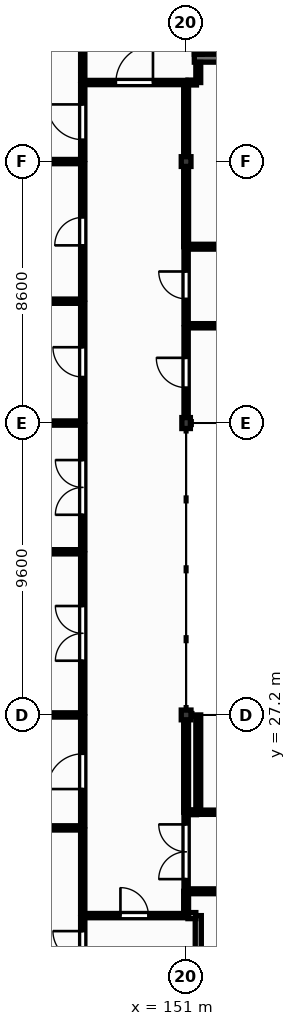
"""IFC4 building model, lengths in metres.
Left out: names, types, materials, properties, quantities, classifications, styles, units other than length and angle.
Written with IfcOpenShell. Run it as: python <this file> out.ifc"""

import sys

from ifc_helpers import new_model, si_unit, direction, frame, frame_2d, origin, origin_2d, place, context, subcontext, project, spatial, rectangle, extrude, element, fill, save


model = new_model("IFC4")
c1 = context("Model", 3, precision=1e-05, world=origin(), true_north=direction((0.0, 1.0)))
c2 = subcontext(c1, "Body", "Model", "MODEL_VIEW")
j1 = project(units=[si_unit("LENGTHUNIT", "METRE"), si_unit("PLANEANGLEUNIT", "RADIAN")], contexts=[c1])
p1 = place(None, origin())
s1 = spatial("IfcSite", under=j1, at=p1, CompositionType="ELEMENT")
p2 = place(p1, origin())
s2 = spatial("IfcBuilding", under=s1, at=p2, CompositionType="ELEMENT")
p3 = place(p2, frame((0.0, 0.0, 9.0)))
s3 = spatial("IfcBuildingStorey", under=s2, at=p3, CompositionType="ELEMENT", Elevation=9.0)
p4 = place(p3, frame((151.0, 27.2, 0.0), z_axis=(0.0, 0.0, 1.0), x_axis=(1.0, 0.0, 0.0)))
e1 = element("IfcColumn", 1, at=p4, inside=s3, PredefinedType="COLUMN", context=c2, shape_type="SweptSolid", body=[
    extrude(rectangle(XDim=0.32, YDim=0.32, at=origin_2d()), origin(), (0.0, 0.0, 1.0), 5.775),
])
p5 = place(p3, frame((151.0, 36.8, 0.0), z_axis=(0.0, 0.0, 1.0), x_axis=(1.0, 0.0, 0.0)))
e2 = element("IfcColumn", 2, at=p5, inside=s3, PredefinedType="COLUMN", context=c2, shape_type="SweptSolid", body=[
    extrude(rectangle(XDim=0.28, YDim=0.36, at=origin_2d()), origin(), (0.0, 0.0, 1.0), 5.775),
])
p6 = place(p3, frame((151.0, 45.4, 0.0), z_axis=(0.0, 0.0, 1.0), x_axis=(1.0, 0.0, 0.0)))
e3 = element("IfcColumn", 3, at=p6, inside=s3, PredefinedType="COLUMN", context=c2, shape_type="SweptSolid", body=[
    extrude(rectangle(XDim=0.32, YDim=0.32, at=origin_2d()), origin(), (0.0, 0.0, 1.0), 5.775),
])
p7 = place(p3, frame((151.27, 48.8, 0.0), z_axis=(0.0, 0.0, 1.0), x_axis=(1.0, 0.0, 0.0)))
e4 = element("IfcWall", 4, at=p7, inside=s3, PredefinedType="SHEAR", context=c2, shape_type="SweptSolid", body=[
    extrude(rectangle(XDim=6.66, YDim=0.26, at=frame_2d((3.33, 0.0))), origin(), (0.0, 0.0, 1.0), 3.95),
])
p8 = place(p3, frame((151.4, 48.93, 0.0), z_axis=(0.0, 0.0, 1.0), x_axis=(0.0, 1.0, 0.0)))
e5 = element("IfcWall", 5, at=p8, inside=s3, PredefinedType="SHEAR", context=c2, shape_type="SweptSolid", body=[
    extrude(rectangle(XDim=2.94, YDim=0.26, at=frame_2d((1.47, 0.0))), origin(), (0.0, 0.0, 1.0), 3.95),
])
p9 = place(p8, frame((0.91, 0.0, 0.0)))
e6 = element("IfcOpeningElement", 6, at=p9, cuts=e5, PredefinedType="OPENING", context=c2, shape_type="SweptSolid", body=[
    extrude(rectangle(XDim=1.12, YDim=2.1, at=frame_2d((0.56, 1.05))), frame((0.0, 0.14, 0.0), z_axis=(0.0, -1.0, 0.0), x_axis=(1.0, 0.0, 0.0)), (0.0, 0.0, 1.0), 0.28),
])
p10 = place(p3, frame((143.8, 23.485, 0.0), z_axis=(0.0, 0.0, 1.0), x_axis=(1.0, 0.0, 0.0)))
e7 = element("IfcWall", 7, at=p10, inside=s3, PredefinedType="PARTITIONING", context=c2, shape_type="SweptSolid", body=[
    extrude(rectangle(XDim=3.8, YDim=0.14, at=frame_2d((1.9, 0.0))), origin(), (0.0, 0.0, 1.0), 3.78),
])
p11 = place(p3, frame((143.94, 27.2, 0.0), z_axis=(0.0, 0.0, 1.0), x_axis=(1.0, 0.0, 0.0)))
e8 = element("IfcWall", 8, at=p11, inside=s3, PredefinedType="PARTITIONING", context=c2, shape_type="SweptSolid", body=[
    extrude(rectangle(XDim=3.66, YDim=0.14, at=frame_2d((1.83, 0.0))), origin(), (0.0, 0.0, 1.0), 3.78),
])
p12 = place(p3, frame((143.8, 32.566, 0.0), z_axis=(0.0, 0.0, 1.0), x_axis=(1.0, 0.0, 0.0)))
e9 = element("IfcWall", 9, at=p12, inside=s3, PredefinedType="PARTITIONING", context=c2, shape_type="SweptSolid", body=[
    extrude(rectangle(XDim=3.8, YDim=0.14, at=frame_2d((1.9, 0.0))), origin(), (0.0, 0.0, 1.0), 3.78),
])
p13 = place(p3, frame((143.96, 36.8, 0.0), z_axis=(0.0, 0.0, 1.0), x_axis=(1.0, 0.0, 0.0)))
e10 = element("IfcWall", 10, at=p13, inside=s3, PredefinedType="PARTITIONING", context=c2, shape_type="SweptSolid", body=[
    extrude(rectangle(XDim=3.64, YDim=0.14, at=frame_2d((1.82, 0.0))), origin(), (0.0, 0.0, 1.0), 3.78),
])
p14 = place(p3, frame((143.8, 40.808, 0.0), z_axis=(0.0, 0.0, 1.0), x_axis=(1.0, 0.0, 0.0)))
e11 = element("IfcWall", 11, at=p14, inside=s3, PredefinedType="PARTITIONING", context=c2, shape_type="SweptSolid", body=[
    extrude(rectangle(XDim=3.8, YDim=0.14, at=frame_2d((1.9, 0.0))), origin(), (0.0, 0.0, 1.0), 3.78),
])
p15 = place(p3, frame((143.94, 45.4, 0.0), z_axis=(0.0, 0.0, 1.0), x_axis=(1.0, 0.0, 0.0)))
e12 = element("IfcWall", 12, at=p15, inside=s3, PredefinedType="PARTITIONING", context=c2, shape_type="SweptSolid", body=[
    extrude(rectangle(XDim=3.66, YDim=0.14, at=frame_2d((1.83, 0.0))), origin(), (0.0, 0.0, 1.0), 3.78),
])
p16 = place(p3, frame((147.6, 18.67, 0.0), z_axis=(0.0, 0.0, 1.0), x_axis=(0.0, 1.0, 0.0)))
e13 = element("IfcWall", 13, at=p16, inside=s3, PredefinedType="PARTITIONING", context=c2, shape_type="SweptSolid", body=[
    extrude(rectangle(XDim=1.86, YDim=0.14, at=frame_2d((0.93, 0.0))), origin(), (0.0, 0.0, 1.0), 3.78),
])
p17 = place(p16, frame((0.44, 0.0, 0.0)))
e14 = element("IfcOpeningElement", 14, at=p17, cuts=e13, PredefinedType="OPENING", context=c2, shape_type="SweptSolid", body=[
    extrude(rectangle(XDim=0.98, YDim=2.15, at=frame_2d((0.49, 1.075))), frame((0.0, 0.08, 0.0), z_axis=(0.0, -1.0, 0.0), x_axis=(1.0, 0.0, 0.0)), (0.0, 0.0, 1.0), 0.16),
])
p18 = place(p3, frame((147.6, 20.67, 0.0), z_axis=(0.0, 0.0, 1.0), x_axis=(0.0, 1.0, 0.0)))
e15 = element("IfcWall", 15, at=p18, inside=s3, PredefinedType="PARTITIONING", context=c2, shape_type="SweptSolid", body=[
    extrude(rectangle(XDim=2.745, YDim=0.14, at=frame_2d((1.373, 0.0))), origin(), (0.0, 0.0, 1.0), 3.78),
])
p19 = place(p3, frame((147.6, 20.6, 0.0), z_axis=(0.0, 0.0, 1.0), x_axis=(1.0, 0.0, 0.0)))
e16 = element("IfcWall", 16, at=p19, inside=s3, PredefinedType="PARTITIONING", context=c2, shape_type="SweptSolid", body=[
    extrude(rectangle(XDim=3.4, YDim=0.14, at=frame_2d((1.7, 0.0))), origin(), (0.0, 0.0, 1.0), 3.78),
])
p20 = place(p19, frame((1.24, 0.0, 0.0)))
e17 = element("IfcOpeningElement", 17, at=p20, cuts=e16, PredefinedType="OPENING", context=c2, shape_type="SweptSolid", body=[
    extrude(rectangle(XDim=0.92, YDim=2.1, at=frame_2d((0.46, 1.05))), frame((0.0, 0.08, 0.0), z_axis=(0.0, -1.0, 0.0), x_axis=(1.0, 0.0, 0.0)), (0.0, 0.0, 1.0), 0.16),
])
p21 = place(p3, frame((147.6, 23.555, 0.0), z_axis=(0.0, 0.0, 1.0), x_axis=(0.0, 1.0, 0.0)))
e18 = element("IfcWall", 18, at=p21, inside=s3, PredefinedType="PARTITIONING", context=c2, shape_type="SweptSolid", body=[
    extrude(rectangle(XDim=3.575, YDim=0.14, at=frame_2d((1.788, 0.0))), origin(), (0.0, 0.0, 1.0), 3.78),
])
p22 = place(p21, frame((1.208, 0.0, 0.0)))
e19 = element("IfcOpeningElement", 19, at=p22, cuts=e18, PredefinedType="OPENING", context=c2, shape_type="SweptSolid", body=[
    extrude(rectangle(XDim=1.16, YDim=2.1, at=frame_2d((0.58, 1.05))), frame((0.0, 0.08, 0.0), z_axis=(0.0, -1.0, 0.0), x_axis=(1.0, 0.0, 0.0)), (0.0, 0.0, 1.0), 0.16),
])
p23 = place(p3, frame((147.6, 27.27, 0.0), z_axis=(0.0, 0.0, 1.0), x_axis=(0.0, 1.0, 0.0)))
e20 = element("IfcWall", 20, at=p23, inside=s3, PredefinedType="PARTITIONING", context=c2, shape_type="SweptSolid", body=[
    extrude(rectangle(XDim=5.226, YDim=0.14, at=frame_2d((2.613, 0.0))), origin(), (0.0, 0.0, 1.0), 3.78),
])
p24 = place(p23, frame((1.713, 0.0, 0.0)))
e21 = element("IfcOpeningElement", 21, at=p24, cuts=e20, PredefinedType="OPENING", context=c2, shape_type="SweptSolid", body=[
    extrude(rectangle(XDim=1.8, YDim=2.3, at=frame_2d((0.9, 1.15))), frame((0.0, 0.08, 0.0), z_axis=(0.0, -1.0, 0.0), x_axis=(1.0, 0.0, 0.0)), (0.0, 0.0, 1.0), 0.16),
])
p25 = place(p3, frame((147.6, 32.636, 0.0), z_axis=(0.0, 0.0, 1.0), x_axis=(0.0, 1.0, 0.0)))
e22 = element("IfcWall", 22, at=p25, inside=s3, PredefinedType="PARTITIONING", context=c2, shape_type="SweptSolid", body=[
    extrude(rectangle(XDim=4.094, YDim=0.14, at=frame_2d((2.047, 0.0))), origin(), (0.0, 0.0, 1.0), 3.78),
])
p26 = place(p25, frame((1.147, 0.0, 0.0)))
e23 = element("IfcOpeningElement", 23, at=p26, cuts=e22, PredefinedType="OPENING", context=c2, shape_type="SweptSolid", body=[
    extrude(rectangle(XDim=1.8, YDim=2.3, at=frame_2d((0.9, 1.15))), frame((0.0, 0.08, 0.0), z_axis=(0.0, -1.0, 0.0), x_axis=(1.0, 0.0, 0.0)), (0.0, 0.0, 1.0), 0.16),
])
p27 = place(p3, frame((147.6, 36.87, 0.0), z_axis=(0.0, 0.0, 1.0), x_axis=(0.0, 1.0, 0.0)))
e24 = element("IfcWall", 24, at=p27, inside=s3, PredefinedType="PARTITIONING", context=c2, shape_type="SweptSolid", body=[
    extrude(rectangle(XDim=3.868, YDim=0.14, at=frame_2d((1.934, 0.0))), origin(), (0.0, 0.0, 1.0), 3.78),
])
p28 = place(p27, frame((1.444, 0.0, 0.0)))
e25 = element("IfcOpeningElement", 25, at=p28, cuts=e24, PredefinedType="OPENING", context=c2, shape_type="SweptSolid", body=[
    extrude(rectangle(XDim=0.98, YDim=2.15, at=frame_2d((0.49, 1.075))), frame((0.0, 0.08, 0.0), z_axis=(0.0, -1.0, 0.0), x_axis=(1.0, 0.0, 0.0)), (0.0, 0.0, 1.0), 0.16),
])
p29 = place(p3, frame((147.6, 40.878, 0.0), z_axis=(0.0, 0.0, 1.0), x_axis=(0.0, 1.0, 0.0)))
e26 = element("IfcWall", 26, at=p29, inside=s3, PredefinedType="PARTITIONING", context=c2, shape_type="SweptSolid", body=[
    extrude(rectangle(XDim=4.452, YDim=0.14, at=frame_2d((2.226, 0.0))), origin(), (0.0, 0.0, 1.0), 3.78),
])
p30 = place(p29, frame((1.766, 0.0, 0.0)))
e27 = element("IfcOpeningElement", 27, at=p30, cuts=e26, PredefinedType="OPENING", context=c2, shape_type="SweptSolid", body=[
    extrude(rectangle(XDim=0.92, YDim=2.1, at=frame_2d((0.46, 1.05))), frame((0.0, 0.08, 0.0), z_axis=(0.0, -1.0, 0.0), x_axis=(1.0, 0.0, 0.0)), (0.0, 0.0, 1.0), 0.16),
])
p31 = place(p3, frame((147.6, 45.47, 0.0), z_axis=(0.0, 0.0, 1.0), x_axis=(0.0, 1.0, 0.0)))
e28 = element("IfcWall", 28, at=p31, inside=s3, PredefinedType="PARTITIONING", context=c2, shape_type="SweptSolid", body=[
    extrude(rectangle(XDim=2.46, YDim=0.14, at=frame_2d((1.23, 0.0))), origin(), (0.0, 0.0, 1.0), 3.78),
])
p32 = place(p31, frame((0.65, 0.0, 0.0)))
e29 = element("IfcOpeningElement", 29, at=p32, cuts=e28, PredefinedType="OPENING", context=c2, shape_type="SweptSolid", body=[
    extrude(rectangle(XDim=1.16, YDim=2.1, at=frame_2d((0.58, 1.05))), frame((0.0, 0.08, 0.0), z_axis=(0.0, -1.0, 0.0), x_axis=(1.0, 0.0, 0.0)), (0.0, 0.0, 1.0), 0.16),
])
p33 = place(p3, frame((147.6, 48.07, 0.0), z_axis=(0.0, 0.0, 1.0), x_axis=(0.0, 1.0, 0.0)))
e30 = element("IfcWall", 30, at=p33, inside=s3, PredefinedType="PARTITIONING", context=c2, shape_type="SweptSolid", body=[
    extrude(rectangle(XDim=4.53, YDim=0.14, at=frame_2d((2.265, 0.0))), origin(), (0.0, 0.0, 1.0), 3.78),
])
p34 = place(p3, frame((147.6, 48.0, 0.0), z_axis=(0.0, 0.0, 1.0), x_axis=(1.0, 0.0, 0.0)))
e31 = element("IfcWall", 31, at=p34, inside=s3, PredefinedType="PARTITIONING", context=c2, shape_type="SweptSolid", body=[
    extrude(rectangle(XDim=3.4, YDim=0.14, at=frame_2d((1.7, 0.0))), origin(), (0.0, 0.0, 1.0), 3.78),
])
p35 = place(p34, frame((1.09, 0.0, 0.0)))
e32 = element("IfcOpeningElement", 32, at=p35, cuts=e31, PredefinedType="OPENING", context=c2, shape_type="SweptSolid", body=[
    extrude(rectangle(XDim=1.22, YDim=2.1, at=frame_2d((0.61, 1.05))), frame((0.0, 0.08, 0.0), z_axis=(0.0, -1.0, 0.0), x_axis=(1.0, 0.0, 0.0)), (0.0, 0.0, 1.0), 0.16),
])
p36 = place(p3, frame((151.0, 21.4, 0.0), z_axis=(0.0, 0.0, 1.0), x_axis=(0.0, 1.0, 0.0)))
e33 = element("IfcWall", 33, at=p36, inside=s3, PredefinedType="PARTITIONING", context=c2, shape_type="SweptSolid", body=[
    extrude(rectangle(XDim=2.6, YDim=0.14, at=frame_2d((1.3, 0.0))), origin(), (0.0, 0.0, 1.0), 3.78),
])
p37 = place(p36, frame((0.4, 0.0, 0.0)))
e34 = element("IfcOpeningElement", 34, at=p37, cuts=e33, PredefinedType="OPENING", context=c2, shape_type="SweptSolid", body=[
    extrude(rectangle(XDim=1.8, YDim=2.3, at=frame_2d((0.9, 1.15))), frame((0.0, 0.08, 0.0), z_axis=(0.0, -1.0, 0.0), x_axis=(1.0, 0.0, 0.0)), (0.0, 0.0, 1.0), 0.16),
])
p38 = place(p3, frame((151.0, 36.98, 0.0), z_axis=(0.0, 0.0, 1.0), x_axis=(0.0, 1.0, 0.0)))
e35 = element("IfcWall", 35, at=p38, inside=s3, PredefinedType="PARTITIONING", context=c2, shape_type="SweptSolid", body=[
    extrude(rectangle(XDim=2.95, YDim=0.14, at=frame_2d((1.475, 0.0))), origin(), (0.0, 0.0, 1.0), 3.78),
])
p39 = place(p38, frame((0.985, 0.0, 0.0)))
e36 = element("IfcOpeningElement", 36, at=p39, cuts=e35, PredefinedType="OPENING", context=c2, shape_type="SweptSolid", body=[
    extrude(rectangle(XDim=0.98, YDim=2.15, at=frame_2d((0.49, 1.075))), frame((0.0, 0.08, 0.0), z_axis=(0.0, -1.0, 0.0), x_axis=(1.0, 0.0, 0.0)), (0.0, 0.0, 1.0), 0.16),
])
p40 = place(p3, frame((151.0, 40.07, 0.0), z_axis=(0.0, 0.0, 1.0), x_axis=(0.0, 1.0, 0.0)))
e37 = element("IfcWall", 37, at=p40, inside=s3, PredefinedType="PARTITIONING", context=c2, shape_type="SweptSolid", body=[
    extrude(rectangle(XDim=2.53, YDim=0.14, at=frame_2d((1.265, 0.0))), origin(), (0.0, 0.0, 1.0), 3.78),
])
p41 = place(p40, frame((0.815, 0.0, 0.0)))
e38 = element("IfcOpeningElement", 38, at=p41, cuts=e37, PredefinedType="OPENING", context=c2, shape_type="SweptSolid", body=[
    extrude(rectangle(XDim=0.9, YDim=2.1, at=frame_2d((0.45, 1.05))), frame((0.0, 0.08, 0.0), z_axis=(0.0, -1.0, 0.0), x_axis=(1.0, 0.0, 0.0)), (0.0, 0.0, 1.0), 0.16),
])
p42 = place(p3, frame((151.0, 40.0, 0.0), z_axis=(0.0, 0.0, 1.0), x_axis=(1.0, 0.0, 0.0)))
e39 = element("IfcWall", 39, at=p42, inside=s3, PredefinedType="PARTITIONING", context=c2, shape_type="SweptSolid", body=[
    extrude(rectangle(XDim=2.866, YDim=0.14, at=frame_2d((1.433, 0.0))), origin(), (0.0, 0.0, 1.0), 3.78),
])
p43 = place(p3, frame((151.4, 24.0, 0.0), z_axis=(0.0, 0.0, 1.0), x_axis=(1.0, 0.0, 0.0)))
e40 = element("IfcWall", 40, at=p43, inside=s3, PredefinedType="PARTITIONING", context=c2, shape_type="SweptSolid", body=[
    extrude(rectangle(XDim=6.8, YDim=0.14, at=frame_2d((3.4, 0.0))), origin(), (0.0, 0.0, 1.0), 3.78),
])
p44 = place(p43, frame((2.5, 0.0, 0.0)))
e41 = element("IfcOpeningElement", 41, at=p44, cuts=e40, PredefinedType="OPENING", context=c2, shape_type="SweptSolid", body=[
    extrude(rectangle(XDim=1.8, YDim=2.3, at=frame_2d((0.9, 1.15))), frame((0.0, 0.08, 0.0), z_axis=(0.0, -1.0, 0.0), x_axis=(1.0, 0.0, 0.0)), (0.0, 0.0, 1.0), 0.16),
])
p45 = place(p3, frame((151.4, 17.91, 0.0), z_axis=(0.0, 0.0, 1.0), x_axis=(0.0, 1.0, 0.0)))
e42 = element("IfcWall", 42, at=p45, inside=s3, PredefinedType="PARTITIONING", context=c2, shape_type="SweptSolid", body=[
    extrude(rectangle(XDim=2.69, YDim=0.2, at=frame_2d((1.345, 0.0))), origin(), (0.0, 0.0, 1.0), 3.78),
])
p46 = place(p3, frame((151.32, 20.6, 0.0), z_axis=(0.0, 0.0, 1.0), x_axis=(-1.0, 0.0, 0.0)))
e43 = element("IfcWall", 43, at=p46, inside=s3, PredefinedType="PARTITIONING", context=c2, shape_type="SweptSolid", body=[
    extrude(rectangle(XDim=0.26, YDim=0.2, at=frame_2d((0.13, 0.0))), origin(), (0.0, 0.0, 1.0), 3.78),
])
p47 = place(p3, frame((151.0, 20.67, 0.0), z_axis=(0.0, 0.0, 1.0), x_axis=(0.0, 1.0, 0.0)))
e44 = element("IfcWall", 44, at=p47, inside=s3, PredefinedType="PARTITIONING", context=c2, shape_type="SweptSolid", body=[
    extrude(rectangle(XDim=0.73, YDim=0.16, at=frame_2d((0.365, 0.0))), origin(), (0.0, 0.0, 1.0), 3.78),
])
p48 = place(p3, frame((151.0, 24.0, 0.0), z_axis=(0.0, 0.0, 1.0), x_axis=(0.0, 1.0, 0.0)))
e45 = element("IfcWall", 45, at=p48, inside=s3, PredefinedType="PARTITIONING", context=c2, shape_type="SweptSolid", body=[
    extrude(rectangle(XDim=3.04, YDim=0.16, at=frame_2d((1.52, 0.0))), origin(), (0.0, 0.0, 1.0), 3.78),
])
p49 = place(p3, frame((151.0, 42.6, 0.0), z_axis=(0.0, 0.0, 1.0), x_axis=(0.0, 1.0, 0.0)))
e46 = element("IfcWall", 46, at=p49, inside=s3, PredefinedType="PARTITIONING", context=c2, shape_type="SweptSolid", body=[
    extrude(rectangle(XDim=2.64, YDim=0.16, at=frame_2d((1.32, 0.0))), origin(), (0.0, 0.0, 1.0), 3.78),
])
p50 = place(p3, frame((151.0, 45.56, 0.0), z_axis=(0.0, 0.0, 1.0), x_axis=(0.0, 1.0, 0.0)))
e47 = element("IfcWall", 47, at=p50, inside=s3, PredefinedType="PARTITIONING", context=c2, shape_type="SweptSolid", body=[
    extrude(rectangle(XDim=2.37, YDim=0.16, at=frame_2d((1.185, 0.0))), origin(), (0.0, 0.0, 1.0), 3.78),
])
p51 = place(p3, frame((151.06, 48.0, 0.0), z_axis=(0.0, 0.0, 1.0), x_axis=(1.0, 0.0, 0.0)))
e48 = element("IfcWall", 48, at=p51, inside=s3, PredefinedType="PARTITIONING", context=c2, shape_type="SweptSolid", body=[
    extrude(rectangle(XDim=0.28, YDim=0.16, at=frame_2d((0.14, 0.0))), origin(), (0.0, 0.0, 1.0), 3.78),
])
p52 = place(p3, frame((151.4, 48.0, 0.0), z_axis=(0.0, 0.0, 1.0), x_axis=(0.0, 1.0, 0.0)))
e49 = element("IfcWall", 49, at=p52, inside=s3, PredefinedType="PARTITIONING", context=c2, shape_type="SweptSolid", body=[
    extrude(rectangle(XDim=0.66, YDim=0.16, at=frame_2d((0.33, 0.0))), origin(), (0.0, 0.0, 1.0), 3.78),
])
p53 = place(p3, frame((151.0, 21.4, 0.0), z_axis=(0.0, 0.0, 1.0), x_axis=(1.0, 0.0, 0.0)))
e50 = element("IfcWall", 50, at=p53, inside=s3, PredefinedType="PARTITIONING", context=c2, shape_type="SweptSolid", body=[
    extrude(rectangle(XDim=3.2, YDim=0.16, at=frame_2d((1.6, 0.0))), origin(), (0.0, 0.0, 1.0), 3.78),
])
p54 = place(p3, frame((151.34, 24.0, 0.0), z_axis=(0.0, 0.0, 1.0), x_axis=(-1.0, 0.0, 0.0)))
e51 = element("IfcWall", 51, at=p54, inside=s3, PredefinedType="PARTITIONING", context=c2, shape_type="SweptSolid", body=[
    extrude(rectangle(XDim=0.28, YDim=0.16, at=frame_2d((0.14, 0.0))), origin(), (0.0, 0.0, 1.0), 3.78),
])
p55 = place(p3, frame((154.2, 42.6, 0.0), z_axis=(0.0, 0.0, 1.0), x_axis=(-1.0, 0.0, 0.0)))
e52 = element("IfcWall", 52, at=p55, inside=s3, PredefinedType="PARTITIONING", context=c2, shape_type="SweptSolid", body=[
    extrude(rectangle(XDim=3.2, YDim=0.16, at=frame_2d((1.6, 0.0))), origin(), (0.0, 0.0, 1.0), 3.78),
])
p56 = place(p3, frame((151.4, 24.07, 0.0), z_axis=(0.0, 0.0, 1.0), x_axis=(0.0, 1.0, 0.0)))
e53 = element("IfcWall", 53, at=p56, inside=s3, PredefinedType="PARTITIONING", context=c2, shape_type="SweptSolid", body=[
    extrude(rectangle(XDim=3.13, YDim=0.16, at=frame_2d((1.565, 0.0))), origin(), (0.0, 0.0, 1.0), 3.78),
])
p57 = place(p20, origin())
e54 = element("IfcDoor", 54, at=p57, inside=s3, OperationType="SINGLE_SWING_LEFT", PredefinedType="DOOR", context=c2, shape_type="SweptSolid", body=[
    extrude(rectangle(XDim=0.92, YDim=2.1, at=frame_2d((0.46, 1.05))), frame((0.0, 0.025, 0.0), z_axis=(0.0, -1.0, 0.0), x_axis=(1.0, 0.0, 0.0)), (0.0, 0.0, 1.0), 0.05),
])
fill(e17, e54)
p58 = place(p35, origin())
e55 = element("IfcDoor", 55, at=p58, inside=s3, OperationType="SINGLE_SWING_RIGHT", PredefinedType="DOOR", context=c2, shape_type="SweptSolid", body=[
    extrude(rectangle(XDim=1.22, YDim=2.1, at=frame_2d((0.61, 1.05))), frame((0.0, 0.025, 0.0), z_axis=(0.0, -1.0, 0.0), x_axis=(1.0, 0.0, 0.0)), (0.0, 0.0, 1.0), 0.05),
])
fill(e32, e55)
p59 = place(p37, origin())
e56 = element("IfcDoor", 56, at=p59, inside=s3, OperationType="DOUBLE_DOOR_SINGLE_SWING", PredefinedType="DOOR", context=c2, shape_type="SweptSolid", body=[
    extrude(rectangle(XDim=1.8, YDim=2.3, at=frame_2d((0.9, 1.15))), frame((0.0, 0.025, 0.0), z_axis=(0.0, -1.0, 0.0), x_axis=(1.0, 0.0, 0.0)), (0.0, 0.0, 1.0), 0.05),
])
fill(e34, e56)
p60 = place(p41, origin())
e57 = element("IfcDoor", 57, at=p60, inside=s3, OperationType="SINGLE_SWING_RIGHT", PredefinedType="DOOR", context=c2, shape_type="SweptSolid", body=[
    extrude(rectangle(XDim=0.9, YDim=2.1, at=frame_2d((0.45, 1.05))), frame((0.0, 0.025, 0.0), z_axis=(0.0, -1.0, 0.0), x_axis=(1.0, 0.0, 0.0)), (0.0, 0.0, 1.0), 0.05),
])
fill(e38, e57)
p61 = place(p17, origin())
e58 = element("IfcDoor", 58, at=p61, inside=s3, OperationType="SINGLE_SWING_RIGHT", PredefinedType="DOOR", context=c2, shape_type="SweptSolid", body=[
    extrude(rectangle(XDim=0.98, YDim=2.15, at=frame_2d((0.49, 1.075))), frame((0.0, 0.025, 0.0), z_axis=(0.0, -1.0, 0.0), x_axis=(1.0, 0.0, 0.0)), (0.0, 0.0, 1.0), 0.05),
])
fill(e14, e58)
p62 = place(p22, origin())
e59 = element("IfcDoor", 59, at=p62, inside=s3, OperationType="SINGLE_SWING_LEFT", PredefinedType="DOOR", context=c2, shape_type="SweptSolid", body=[
    extrude(rectangle(XDim=1.16, YDim=2.1, at=frame_2d((0.58, 1.05))), frame((0.0, 0.025, 0.0), z_axis=(0.0, -1.0, 0.0), x_axis=(1.0, 0.0, 0.0)), (0.0, 0.0, 1.0), 0.05),
])
fill(e19, e59)
p63 = place(p24, origin())
e60 = element("IfcDoor", 60, at=p63, inside=s3, OperationType="DOUBLE_DOOR_SINGLE_SWING", PredefinedType="DOOR", context=c2, shape_type="SweptSolid", body=[
    extrude(rectangle(XDim=1.8, YDim=2.3, at=frame_2d((0.9, 1.15))), frame((0.0, 0.025, 0.0), z_axis=(0.0, -1.0, 0.0), x_axis=(1.0, 0.0, 0.0)), (0.0, 0.0, 1.0), 0.05),
])
fill(e21, e60)
p64 = place(p26, origin())
e61 = element("IfcDoor", 61, at=p64, inside=s3, OperationType="DOUBLE_DOOR_SINGLE_SWING", PredefinedType="DOOR", context=c2, shape_type="SweptSolid", body=[
    extrude(rectangle(XDim=1.8, YDim=2.3, at=frame_2d((0.9, 1.15))), frame((0.0, 0.025, 0.0), z_axis=(0.0, -1.0, 0.0), x_axis=(1.0, 0.0, 0.0)), (0.0, 0.0, 1.0), 0.05),
])
fill(e23, e61)
p65 = place(p28, origin())
e62 = element("IfcDoor", 62, at=p65, inside=s3, OperationType="SINGLE_SWING_RIGHT", PredefinedType="DOOR", context=c2, shape_type="SweptSolid", body=[
    extrude(rectangle(XDim=0.98, YDim=2.15, at=frame_2d((0.49, 1.075))), frame((0.0, 0.025, 0.0), z_axis=(0.0, -1.0, 0.0), x_axis=(1.0, 0.0, 0.0)), (0.0, 0.0, 1.0), 0.05),
])
fill(e25, e62)
p66 = place(p30, origin())
e63 = element("IfcDoor", 63, at=p66, inside=s3, OperationType="SINGLE_SWING_LEFT", PredefinedType="DOOR", context=c2, shape_type="SweptSolid", body=[
    extrude(rectangle(XDim=0.92, YDim=2.1, at=frame_2d((0.46, 1.05))), frame((0.0, 0.025, 0.0), z_axis=(0.0, -1.0, 0.0), x_axis=(1.0, 0.0, 0.0)), (0.0, 0.0, 1.0), 0.05),
])
fill(e27, e63)
p67 = place(p32, origin())
e64 = element("IfcDoor", 64, at=p67, inside=s3, OperationType="SINGLE_SWING_RIGHT", PredefinedType="DOOR", context=c2, shape_type="SweptSolid", body=[
    extrude(rectangle(XDim=1.16, YDim=2.1, at=frame_2d((0.58, 1.05))), frame((0.0, 0.025, 0.0), z_axis=(0.0, -1.0, 0.0), x_axis=(1.0, 0.0, 0.0)), (0.0, 0.0, 1.0), 0.05),
])
fill(e29, e64)
p68 = place(p39, origin())
e65 = element("IfcDoor", 65, at=p68, inside=s3, OperationType="SINGLE_SWING_RIGHT", PredefinedType="DOOR", context=c2, shape_type="SweptSolid", body=[
    extrude(rectangle(XDim=0.98, YDim=2.15, at=frame_2d((0.49, 1.075))), frame((0.0, 0.025, 0.0), z_axis=(0.0, -1.0, 0.0), x_axis=(1.0, 0.0, 0.0)), (0.0, 0.0, 1.0), 0.05),
])
fill(e36, e65)
save(model, sys.argv[1])
